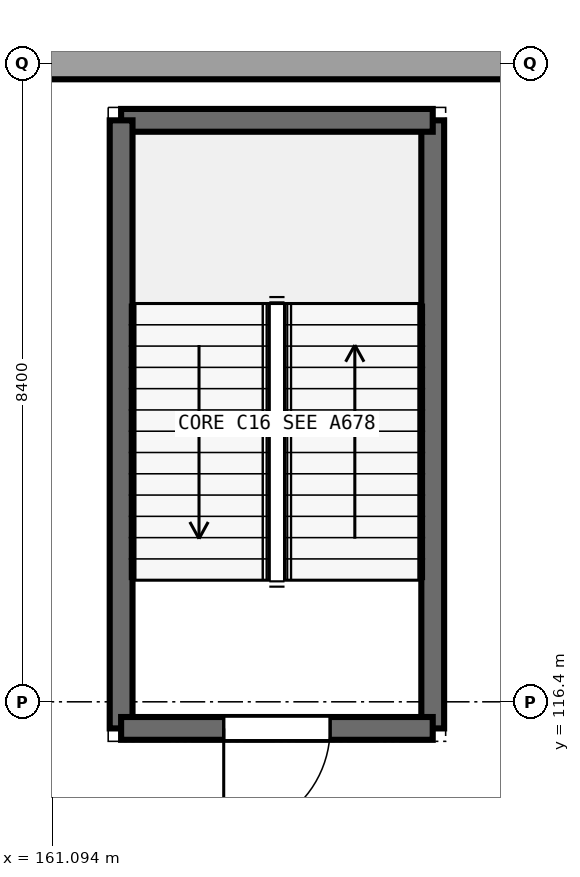
"""IFC4 building model, lengths in metres.
Left out: names, types, materials, properties, quantities, classifications, styles, units other than length and angle.
Written with IfcOpenShell. Run it as: python <this file> out.ifc"""

import sys

from ifc_helpers import new_model, si_unit, direction, frame, frame_2d, origin, place, context, subcontext, project, spatial, rectangle, extrude, element, fill, save


model = new_model("IFC4")
c1 = context("Model", 3, precision=1e-05, world=origin(), true_north=direction((0.0, 1.0)))
c2 = subcontext(c1, "Body", "Model", "MODEL_VIEW")
j1 = project(units=[si_unit("LENGTHUNIT", "METRE"), si_unit("PLANEANGLEUNIT", "RADIAN")], contexts=[c1])
p1 = place(None, origin())
s1 = spatial("IfcSite", under=j1, at=p1, CompositionType="ELEMENT")
p2 = place(p1, origin())
s2 = spatial("IfcBuilding", under=s1, at=p2, CompositionType="ELEMENT")
p3 = place(p2, frame((0.0, 0.0, -4.8)))
s3 = spatial("IfcBuildingStorey", under=s2, at=p3, CompositionType="ELEMENT", Elevation=-4.8)
p4 = place(p3, frame((159.6, 124.8, 0.0), z_axis=(0.0, 0.0, 1.0), x_axis=(1.0, 0.0, 0.0)))
e1 = element("IfcWall", 1, at=p4, inside=s3, PredefinedType="SOLIDWALL", context=c2, shape_type="SweptSolid", body=[
    extrude(rectangle(XDim=8.4, YDim=0.42, at=frame_2d((4.2, 0.0))), origin(), (0.0, 0.0, 1.0), 4.05),
])
p5 = place(p3, frame((166.1, 116.05, 0.0), z_axis=(0.0, 0.0, 1.0), x_axis=(0.0, 1.0, 0.0)))
e2 = element("IfcWall", 2, at=p5, inside=s3, PredefinedType="SHEAR", context=c2, shape_type="SweptSolid", body=[
    extrude(rectangle(XDim=8.0, YDim=0.3, at=frame_2d((4.0, 0.0))), origin(), (0.0, 0.0, 1.0), 4.8),
])
p6 = place(p3, frame((166.1, 124.05, 0.0), z_axis=(0.0, 0.0, 1.0), x_axis=(-1.0, 0.0, 0.0)))
e3 = element("IfcWall", 3, at=p6, inside=s3, PredefinedType="SHEAR", context=c2, shape_type="SweptSolid", body=[
    extrude(rectangle(XDim=4.1, YDim=0.3, at=frame_2d((2.05, 0.0))), origin(), (0.0, 0.0, 1.0), 4.8),
])
p7 = place(p3, frame((162.0, 124.05, 0.0), z_axis=(0.0, 0.0, 1.0), x_axis=(0.0, -1.0, 0.0)))
e4 = element("IfcWall", 4, at=p7, inside=s3, PredefinedType="SHEAR", context=c2, shape_type="SweptSolid", body=[
    extrude(rectangle(XDim=8.0, YDim=0.3, at=frame_2d((4.0, 0.0))), origin(), (0.0, 0.0, 1.0), 4.8),
])
p8 = place(p3, frame((162.0, 116.05, 0.0), z_axis=(0.0, 0.0, 1.0), x_axis=(1.0, 0.0, 0.0)))
e5 = element("IfcWall", 5, at=p8, inside=s3, PredefinedType="SHEAR", context=c2, shape_type="SweptSolid", body=[
    extrude(rectangle(XDim=4.1, YDim=0.3, at=frame_2d((2.05, 0.0))), origin(), (0.0, 0.0, 1.0), 4.8),
])
p9 = place(p8, frame((1.35, 0.0, 0.0)))
e6 = element("IfcOpeningElement", 6, at=p9, cuts=e5, PredefinedType="OPENING", context=c2, shape_type="SweptSolid", body=[
    extrude(rectangle(XDim=1.4, YDim=2.2, at=frame_2d((0.7, 1.1))), frame((0.0, 0.16, 0.0), z_axis=(0.0, -1.0, 0.0), x_axis=(1.0, 0.0, 0.0)), (0.0, 0.0, 1.0), 0.32),
])
p10 = place(p9, frame((1.4, 0.0, 0.0), z_axis=(0.0, 0.0, 1.0), x_axis=(-1.0, 0.0, 0.0)))
e7 = element("IfcDoor", 7, at=p10, inside=s3, OperationType="SINGLE_SWING_RIGHT", PredefinedType="DOOR", context=c2, shape_type="SweptSolid", body=[
    extrude(rectangle(XDim=1.4, YDim=2.2, at=frame_2d((0.7, 1.1))), frame((0.0, 0.025, 0.0), z_axis=(0.0, -1.0, 0.0), x_axis=(1.0, 0.0, 0.0)), (0.0, 0.0, 1.0), 0.05),
])
fill(e6, e7)
save(model, sys.argv[1])
